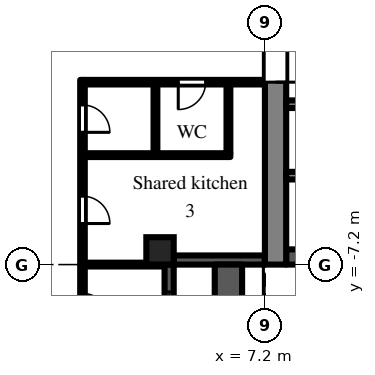
"""IFC4 building model, lengths in metres.
Left out: names, types, materials, properties, quantities, classifications, styles, units other than length and angle.
Written with IfcOpenShell. Run it as: python <this file> out.ifc"""

import sys

from ifc_helpers import new_model, si_unit, direction, frame, frame_2d, origin, origin_2d, place, context, subcontext, project, spatial, rectangle, extrude, element, fill, save


model = new_model("IFC4")
c1 = context("Model", 3, precision=1e-05, world=origin(), true_north=direction((0.0, 1.0)))
c2 = subcontext(c1, "Body", "Model", "MODEL_VIEW")
j1 = project(units=[si_unit("LENGTHUNIT", "METRE"), si_unit("PLANEANGLEUNIT", "RADIAN")], contexts=[c1])
p1 = place(None, origin())
s1 = spatial("IfcSite", under=j1, at=p1, CompositionType="ELEMENT")
p2 = place(p1, origin())
s2 = spatial("IfcBuilding", under=s1, at=p2, CompositionType="ELEMENT")
p3 = place(p2, frame((0.0, 0.0, 53.7)))
s3 = spatial("IfcBuildingStorey", under=s2, at=p3, CompositionType="ELEMENT", Elevation=53.7)
p4 = place(p3, frame((3.75, -6.75, 0.0), z_axis=(0.0, 0.0, 1.0), x_axis=(1.0, 0.0, 0.0)))
e1 = element("IfcColumn", 1, at=p4, inside=s3, PredefinedType="COLUMN", context=c2, shape_type="SweptSolid", body=[
    extrude(rectangle(XDim=0.9, YDim=0.9, at=origin_2d()), origin(), (0.0, 0.0, 1.0), 3.0),
])
p5 = place(p3, frame((4.05, -14.4, 0.0), z_axis=(0.0, 0.0, 1.0), x_axis=(0.0, 1.0, 0.0)))
e2 = element("IfcWall", 2, at=p5, inside=s3, PredefinedType="SOLIDWALL", context=c2, shape_type="SweptSolid", body=[
    extrude(rectangle(XDim=7.2, YDim=0.3, at=frame_2d((3.6, 0.0))), origin(), (0.0, 0.0, 1.0), 2.1),
])
p6 = place(p5, frame((3.0, 0.0, 0.0)))
e3 = element("IfcOpeningElement", 3, at=p6, cuts=e2, PredefinedType="OPENING", context=c2, shape_type="SweptSolid", body=[
    extrude(rectangle(XDim=1.2, YDim=2.05, at=frame_2d((0.6, 1.025))), frame((0.0, 0.16, 0.0), z_axis=(0.0, -1.0, 0.0), x_axis=(1.0, 0.0, 0.0)), (0.0, 0.0, 1.0), 0.32),
])
p7 = place(p5, frame((0.9, 0.0, 0.2)))
e4 = element("IfcOpeningElement", 4, at=p7, cuts=e2, PredefinedType="OPENING", context=c2, shape_type="SweptSolid", body=[
    extrude(rectangle(XDim=1.8, YDim=1.85, at=frame_2d((0.9, 0.925))), frame((0.0, 0.16, 0.0), z_axis=(0.0, -1.0, 0.0), x_axis=(1.0, 0.0, 0.0)), (0.0, 0.0, 1.0), 0.32),
])
p8 = place(p5, frame((4.5, 0.0, 0.2)))
e5 = element("IfcOpeningElement", 5, at=p8, cuts=e2, PredefinedType="OPENING", context=c2, shape_type="SweptSolid", body=[
    extrude(rectangle(XDim=1.8, YDim=1.85, at=frame_2d((0.9, 0.925))), frame((0.0, 0.16, 0.0), z_axis=(0.0, -1.0, 0.0), x_axis=(1.0, 0.0, 0.0)), (0.0, 0.0, 1.0), 0.32),
])
p9 = place(p3, frame((4.2, -7.05, 0.0), z_axis=(0.0, 0.0, 1.0), x_axis=(1.0, 0.0, 0.0)))
e6 = element("IfcWall", 6, at=p9, inside=s3, PredefinedType="SOLIDWALL", context=c2, shape_type="SweptSolid", body=[
    extrude(rectangle(XDim=3.0, YDim=0.3, at=frame_2d((1.5, 0.0))), origin(), (0.0, 0.0, 1.0), 2.1),
])
p10 = place(p3, frame((6.0, -14.4, 0.0), z_axis=(0.0, 0.0, 1.0), x_axis=(0.0, 1.0, 0.0)))
e7 = element("IfcWall", 7, at=p10, inside=s3, PredefinedType="PARAPET", context=c2, shape_type="SweptSolid", body=[
    extrude(rectangle(XDim=7.2, YDim=0.9, at=frame_2d((3.6, 0.0))), origin(), (0.0, 0.0, 1.0), 0.8),
])
p11 = place(p3, frame((7.55, -7.2, 0.0), z_axis=(0.0, 0.0, 1.0), x_axis=(0.0, 1.0, 0.0)))
e8 = element("IfcWall", 8, at=p11, inside=s3, PredefinedType="SHEAR", context=c2, shape_type="SweptSolid", body=[
    extrude(rectangle(XDim=14.4, YDim=0.7, at=frame_2d((7.2, 0.0))), origin(), (0.0, 0.0, 1.0), 2.575),
])
p12 = place(p11, frame((6.0, 0.0, 0.0)))
e9 = element("IfcOpeningElement", 9, at=p12, cuts=e8, PredefinedType="OPENING", context=c2, shape_type="SweptSolid", body=[
    extrude(rectangle(XDim=2.4, YDim=2.2, at=frame_2d((1.2, 1.1))), frame((0.0, 0.36, 0.0), z_axis=(0.0, -1.0, 0.0), x_axis=(1.0, 0.0, 0.0)), (0.0, 0.0, 1.0), 0.72),
])
p13 = place(p3, frame((7.9, -6.95, 0.0), z_axis=(0.0, 0.0, 1.0), x_axis=(1.0, 0.0, 0.0)))
e10 = element("IfcWall", 10, at=p13, inside=s3, PredefinedType="SHEAR", context=c2, shape_type="SweptSolid", body=[
    extrude(rectangle(XDim=12.95, YDim=0.5, at=frame_2d((6.475, 0.0))), origin(), (0.0, 0.0, 1.0), 2.575),
])
p14 = place(p3, frame((7.9, -1.925, 0.0), z_axis=(0.0, 0.0, 1.0), x_axis=(1.0, 0.0, 0.0)))
e11 = element("IfcWall", 11, at=p14, inside=s3, PredefinedType="SHEAR", context=c2, shape_type="SweptSolid", body=[
    extrude(rectangle(XDim=12.95, YDim=0.25, at=frame_2d((6.475, 0.0))), origin(), (0.0, 0.0, 1.0), 2.575),
])
p15 = place(p14, frame((4.825, 0.0, 0.0)))
e12 = element("IfcOpeningElement", 12, at=p15, cuts=e11, PredefinedType="OPENING", context=c2, shape_type="SweptSolid", body=[
    extrude(rectangle(XDim=1.1, YDim=2.1, at=frame_2d((0.55, 1.05))), frame((0.0, 0.135, 0.0), z_axis=(0.0, -1.0, 0.0), x_axis=(1.0, 0.0, 0.0)), (0.0, 0.0, 1.0), 0.27),
])
p16 = place(p14, frame((7.025, 0.0, 0.0)))
e13 = element("IfcOpeningElement", 13, at=p16, cuts=e11, PredefinedType="OPENING", context=c2, shape_type="SweptSolid", body=[
    extrude(rectangle(XDim=1.1, YDim=2.1, at=frame_2d((0.55, 1.05))), frame((0.0, 0.135, 0.0), z_axis=(0.0, -1.0, 0.0), x_axis=(1.0, 0.0, 0.0)), (0.0, 0.0, 1.0), 0.27),
])
p17 = place(p14, frame((9.225, 0.0, 0.0)))
e14 = element("IfcOpeningElement", 14, at=p17, cuts=e11, PredefinedType="OPENING", context=c2, shape_type="SweptSolid", body=[
    extrude(rectangle(XDim=1.1, YDim=2.1, at=frame_2d((0.55, 1.05))), frame((0.0, 0.135, 0.0), z_axis=(0.0, -1.0, 0.0), x_axis=(1.0, 0.0, 0.0)), (0.0, 0.0, 1.0), 0.27),
])
p18 = place(p14, frame((0.525, 0.0, 0.0)))
e15 = element("IfcOpeningElement", 15, at=p18, cuts=e11, PredefinedType="OPENING", context=c2, shape_type="SweptSolid", body=[
    extrude(rectangle(XDim=0.9, YDim=2.1, at=frame_2d((0.45, 1.05))), frame((0.0, 0.135, 0.0), z_axis=(0.0, -1.0, 0.0), x_axis=(1.0, 0.0, 0.0)), (0.0, 0.0, 1.0), 0.27),
])
p19 = place(p14, frame((2.625, 0.0, 0.0)))
e16 = element("IfcOpeningElement", 16, at=p19, cuts=e11, PredefinedType="OPENING", context=c2, shape_type="SweptSolid", body=[
    extrude(rectangle(XDim=1.1, YDim=2.1, at=frame_2d((0.55, 1.05))), frame((0.0, 0.135, 0.0), z_axis=(0.0, -1.0, 0.0), x_axis=(1.0, 0.0, 0.0)), (0.0, 0.0, 1.0), 0.27),
])
p20 = place(p3, frame((7.9, -4.275, 0.0), z_axis=(0.0, 0.0, 1.0), x_axis=(1.0, 0.0, 0.0)))
e17 = element("IfcWall", 17, at=p20, inside=s3, PredefinedType="SHEAR", context=c2, shape_type="SweptSolid", body=[
    extrude(rectangle(XDim=1.95, YDim=0.25, at=frame_2d((0.975, 0.0))), origin(), (0.0, 0.0, 1.0), 2.575),
])
p21 = place(p3, frame((1.2, -36.5, 0.0), z_axis=(0.0, 0.0, 1.0), x_axis=(0.0, 1.0, 0.0)))
e18 = element("IfcWall", 18, at=p21, inside=s3, PredefinedType="PARTITIONING", context=c2, shape_type="SweptSolid", body=[
    extrude(rectangle(XDim=35.375, YDim=0.15, at=frame_2d((17.688, 0.0))), origin(), (0.0, 0.0, 1.0), 2.575),
])
p22 = place(p21, frame((33.65, 0.0, 0.0)))
e19 = element("IfcOpeningElement", 19, at=p22, cuts=e18, PredefinedType="OPENING", context=c2, shape_type="SweptSolid", body=[
    extrude(rectangle(XDim=0.9, YDim=2.1, at=frame_2d((0.45, 1.05))), frame((0.0, 0.085, 0.0), z_axis=(0.0, -1.0, 0.0), x_axis=(1.0, 0.0, 0.0)), (0.0, 0.0, 1.0), 0.17),
])
p23 = place(p21, frame((30.65, 0.0, 0.0)))
e20 = element("IfcOpeningElement", 20, at=p23, cuts=e18, PredefinedType="OPENING", context=c2, shape_type="SweptSolid", body=[
    extrude(rectangle(XDim=0.9, YDim=2.1, at=frame_2d((0.45, 1.05))), frame((0.0, 0.085, 0.0), z_axis=(0.0, -1.0, 0.0), x_axis=(1.0, 0.0, 0.0)), (0.0, 0.0, 1.0), 0.17),
])
p24 = place(p21, frame((27.45, 0.0, 0.0)))
e21 = element("IfcOpeningElement", 21, at=p24, cuts=e18, PredefinedType="OPENING", context=c2, shape_type="SweptSolid", body=[
    extrude(rectangle(XDim=0.9, YDim=2.1, at=frame_2d((0.45, 1.05))), frame((0.0, 0.085, 0.0), z_axis=(0.0, -1.0, 0.0), x_axis=(1.0, 0.0, 0.0)), (0.0, 0.0, 1.0), 0.17),
])
p25 = place(p21, frame((23.85, 0.0, 0.0)))
e22 = element("IfcOpeningElement", 22, at=p25, cuts=e18, PredefinedType="OPENING", context=c2, shape_type="SweptSolid", body=[
    extrude(rectangle(XDim=0.9, YDim=2.1, at=frame_2d((0.45, 1.05))), frame((0.0, 0.085, 0.0), z_axis=(0.0, -1.0, 0.0), x_axis=(1.0, 0.0, 0.0)), (0.0, 0.0, 1.0), 0.17),
])
p26 = place(p21, frame((20.75, 0.0, 0.0)))
e23 = element("IfcOpeningElement", 23, at=p26, cuts=e18, PredefinedType="OPENING", context=c2, shape_type="SweptSolid", body=[
    extrude(rectangle(XDim=0.9, YDim=2.1, at=frame_2d((0.45, 1.05))), frame((0.0, 0.085, 0.0), z_axis=(0.0, -1.0, 0.0), x_axis=(1.0, 0.0, 0.0)), (0.0, 0.0, 1.0), 0.17),
])
p27 = place(p21, frame((18.95, 0.0, 0.0)))
e24 = element("IfcOpeningElement", 24, at=p27, cuts=e18, PredefinedType="OPENING", context=c2, shape_type="SweptSolid", body=[
    extrude(rectangle(XDim=0.9, YDim=2.1, at=frame_2d((0.45, 1.05))), frame((0.0, 0.085, 0.0), z_axis=(0.0, -1.0, 0.0), x_axis=(1.0, 0.0, 0.0)), (0.0, 0.0, 1.0), 0.17),
])
p28 = place(p21, frame((1.55, 0.0, 0.0)))
e25 = element("IfcOpeningElement", 25, at=p28, cuts=e18, PredefinedType="OPENING", context=c2, shape_type="SweptSolid", body=[
    extrude(rectangle(XDim=1.0, YDim=2.1, at=frame_2d((0.5, 1.05))), frame((0.0, 0.085, 0.0), z_axis=(0.0, -1.0, 0.0), x_axis=(1.0, 0.0, 0.0)), (0.0, 0.0, 1.0), 0.17),
])
p29 = place(p3, frame((1.275, -7.2, 0.0), z_axis=(0.0, 0.0, 1.0), x_axis=(1.0, 0.0, 0.0)))
e26 = element("IfcWall", 26, at=p29, inside=s3, PredefinedType="PARTITIONING", context=c2, shape_type="SweptSolid", body=[
    extrude(rectangle(XDim=2.625, YDim=0.125, at=frame_2d((1.312, 0.0))), origin(), (0.0, 0.0, 1.0), 2.575),
])
p30 = place(p3, frame((1.275, -3.6, 0.0), z_axis=(0.0, 0.0, 1.0), x_axis=(1.0, 0.0, 0.0)))
e27 = element("IfcWall", 27, at=p30, inside=s3, PredefinedType="PARTITIONING", context=c2, shape_type="SweptSolid", body=[
    extrude(rectangle(XDim=4.788, YDim=0.125, at=frame_2d((2.394, 0.0))), origin(), (0.0, 0.0, 1.0), 2.575),
])
p31 = place(p3, frame((1.275, -1.2, 0.0), z_axis=(0.0, 0.0, 1.0), x_axis=(1.0, 0.0, 0.0)))
e28 = element("IfcWall", 28, at=p31, inside=s3, PredefinedType="PARTITIONING", context=c2, shape_type="SweptSolid", body=[
    extrude(rectangle(XDim=5.925, YDim=0.15, at=frame_2d((2.962, 0.0))), origin(), (0.0, 0.0, 1.0), 2.575),
])
p32 = place(p31, frame((3.075, 0.0, 0.0)))
e29 = element("IfcOpeningElement", 29, at=p32, cuts=e28, PredefinedType="OPENING", context=c2, shape_type="SweptSolid", body=[
    extrude(rectangle(XDim=0.9, YDim=2.1, at=frame_2d((0.45, 1.05))), frame((0.0, 0.085, 0.0), z_axis=(0.0, -1.0, 0.0), x_axis=(1.0, 0.0, 0.0)), (0.0, 0.0, 1.0), 0.17),
])
for number, where, z_axis, x_axis in (
    (30, (3.6, -3.538, 0.0), (0.0, 0.0, 1.0), (0.0, 1.0, 0.0)),
    (31, (6.0, -3.538, 0.0), (0.0, 0.0, 1.0), (0.0, 1.0, 0.0)),
):
    element("IfcWall", number, at=place(p3, frame(where, z_axis=z_axis, x_axis=x_axis)), inside=s3, PredefinedType="PARTITIONING", context=c2, shape_type="SweptSolid", body=[
        extrude(rectangle(XDim=2.263, YDim=0.125, at=frame_2d((1.131, 0.0))), origin(), (0.0, 0.0, 1.0), 2.575),
    ])
p33 = place(p8, origin())
e32 = element("IfcWindow", 32, at=p33, inside=s3, PartitioningType="SINGLE_PANEL", PredefinedType="WINDOW", context=c2, shape_type="SweptSolid", body=[
    extrude(rectangle(XDim=1.8, YDim=1.85, at=frame_2d((0.9, 0.925))), frame((0.0, 0.03, 0.0), z_axis=(0.0, -1.0, 0.0), x_axis=(1.0, 0.0, 0.0)), (0.0, 0.0, 1.0), 0.06),
])
fill(e5, e32)
p34 = place(p12, frame((2.4, 0.0, 0.0), z_axis=(0.0, 0.0, 1.0), x_axis=(-1.0, 0.0, 0.0)))
e33 = element("IfcDoor", 33, at=p34, inside=s3, OperationType="DOUBLE_DOOR_DOUBLE_SWING", PredefinedType="DOOR", context=c2, shape_type="SweptSolid", body=[
    extrude(rectangle(XDim=2.4, YDim=2.2, at=frame_2d((1.2, 1.1))), frame((0.0, 0.025, 0.0), z_axis=(0.0, -1.0, 0.0), x_axis=(1.0, 0.0, 0.0)), (0.0, 0.0, 1.0), 0.05),
])
fill(e9, e33)
p35 = place(p22, frame((0.9, 0.0, 0.0), z_axis=(0.0, 0.0, 1.0), x_axis=(-1.0, 0.0, 0.0)))
e34 = element("IfcDoor", 34, at=p35, inside=s3, OperationType="SINGLE_SWING_RIGHT", PredefinedType="DOOR", context=c2, shape_type="SweptSolid", body=[
    extrude(rectangle(XDim=0.9, YDim=2.1, at=frame_2d((0.45, 1.05))), frame((0.0, 0.025, 0.0), z_axis=(0.0, -1.0, 0.0), x_axis=(1.0, 0.0, 0.0)), (0.0, 0.0, 1.0), 0.05),
])
fill(e19, e34)
p36 = place(p32, frame((0.9, 0.0, 0.0), z_axis=(0.0, 0.0, 1.0), x_axis=(-1.0, 0.0, 0.0)))
e35 = element("IfcDoor", 35, at=p36, inside=s3, OperationType="SINGLE_SWING_RIGHT", PredefinedType="DOOR", context=c2, shape_type="SweptSolid", body=[
    extrude(rectangle(XDim=0.9, YDim=2.1, at=frame_2d((0.45, 1.05))), frame((0.0, 0.025, 0.0), z_axis=(0.0, -1.0, 0.0), x_axis=(1.0, 0.0, 0.0)), (0.0, 0.0, 1.0), 0.05),
])
fill(e29, e35)
p37 = place(p23, frame((0.9, 0.0, 0.0), z_axis=(0.0, 0.0, 1.0), x_axis=(-1.0, 0.0, 0.0)))
e36 = element("IfcDoor", 36, at=p37, inside=s3, OperationType="SINGLE_SWING_RIGHT", PredefinedType="DOOR", context=c2, shape_type="SweptSolid", body=[
    extrude(rectangle(XDim=0.9, YDim=2.1, at=frame_2d((0.45, 1.05))), frame((0.0, 0.025, 0.0), z_axis=(0.0, -1.0, 0.0), x_axis=(1.0, 0.0, 0.0)), (0.0, 0.0, 1.0), 0.05),
])
fill(e20, e36)
p38 = place(p24, frame((0.9, 0.0, 0.0), z_axis=(0.0, 0.0, 1.0), x_axis=(-1.0, 0.0, 0.0)))
e37 = element("IfcDoor", 37, at=p38, inside=s3, OperationType="SINGLE_SWING_RIGHT", PredefinedType="DOOR", context=c2, shape_type="SweptSolid", body=[
    extrude(rectangle(XDim=0.9, YDim=2.1, at=frame_2d((0.45, 1.05))), frame((0.0, 0.025, 0.0), z_axis=(0.0, -1.0, 0.0), x_axis=(1.0, 0.0, 0.0)), (0.0, 0.0, 1.0), 0.05),
])
fill(e21, e37)
save(model, sys.argv[1])
